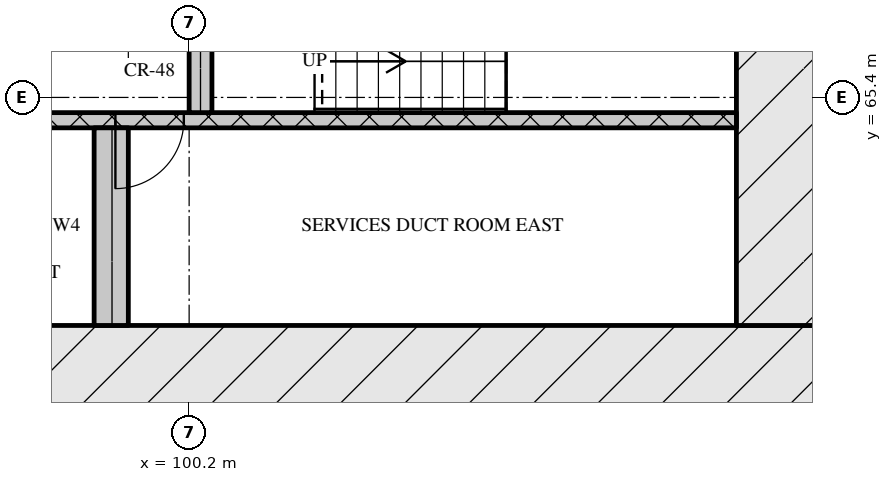
"""IFC4 building model, lengths in metres.
Left out: names, types, materials, properties, quantities, classifications, styles, units other than length and angle.
Written with IfcOpenShell. Run it as: python <this file> out.ifc"""

import sys

from ifc_helpers import new_model, si_unit, direction, frame, frame_2d, origin, place, context, subcontext, project, spatial, rectangle, extrude, element, fill, save


model = new_model("IFC4")
c1 = context("Model", 3, precision=1e-05, world=origin(), true_north=direction((0.0, 1.0)))
c2 = subcontext(c1, "Body", "Model", "MODEL_VIEW")
j1 = project(units=[si_unit("LENGTHUNIT", "METRE"), si_unit("PLANEANGLEUNIT", "RADIAN")], contexts=[c1])
p1 = place(None, origin())
s1 = spatial("IfcSite", under=j1, at=p1, CompositionType="ELEMENT")
p2 = place(p1, origin())
s2 = spatial("IfcBuilding", under=s1, at=p2, CompositionType="ELEMENT")
p3 = place(p2, frame((0.0, 0.0, 58.8)))
s3 = spatial("IfcBuildingStorey", under=s2, at=p3, CompositionType="ELEMENT", Elevation=58.8)
p4 = place(p3, frame((66.6, 61.8, 0.0), z_axis=(0.0, 0.0, 1.0), x_axis=(1.0, 0.0, 0.0)))
e1 = element("IfcWall", 1, at=p4, inside=s3, PredefinedType="SOLIDWALL", context=c2, shape_type="SweptSolid", body=[
    extrude(rectangle(XDim=42.0, YDim=1.2, at=frame_2d((21.0, 0.0))), origin(), (0.0, 0.0, 1.0), 3.32),
])
p5 = place(p4, frame((21.35, 0.0, 0.0)))
e2 = element("IfcOpeningElement", 2, at=p5, cuts=e1, PredefinedType="OPENING", context=c2, shape_type="SweptSolid", body=[
    extrude(rectangle(XDim=1.8, YDim=2.1, at=frame_2d((0.9, 1.05))), frame((0.0, 0.61, 0.0), z_axis=(0.0, -1.0, 0.0), x_axis=(1.0, 0.0, 0.0)), (0.0, 0.0, 1.0), 1.22),
])
p6 = place(p3, frame((108.0, 62.4, 0.0), z_axis=(0.0, 0.0, 1.0), x_axis=(0.0, 1.0, 0.0)))
e3 = element("IfcWall", 3, at=p6, inside=s3, PredefinedType="SOLIDWALL", context=c2, shape_type="SweptSolid", body=[
    extrude(rectangle(XDim=12.0, YDim=1.2, at=frame_2d((6.0, 0.0))), origin(), (0.0, 0.0, 1.0), 3.32),
])
p7 = place(p6, frame((6.45, 0.0, 0.0)))
e4 = element("IfcOpeningElement", 4, at=p7, cuts=e3, PredefinedType="OPENING", context=c2, shape_type="SweptSolid", body=[
    extrude(rectangle(XDim=1.2, YDim=2.1, at=frame_2d((0.6, 1.05))), frame((0.0, 0.61, 0.0), z_axis=(0.0, -1.0, 0.0), x_axis=(1.0, 0.0, 0.0)), (0.0, 0.0, 1.0), 1.22),
])
p8 = place(p3, frame((99.175, 62.4, 0.0), z_axis=(0.0, 0.0, 1.0), x_axis=(0.0, 1.0, 0.0)))
e5 = element("IfcWall", 5, at=p8, inside=s3, PredefinedType="SOLIDWALL", context=c2, shape_type="SweptSolid", body=[
    extrude(rectangle(XDim=2.6, YDim=0.45, at=frame_2d((1.3, 0.0))), origin(), (0.0, 0.0, 1.0), 3.32),
])
p9 = place(p3, frame((91.4, 65.1, 0.0), z_axis=(0.0, 0.0, 1.0), x_axis=(1.0, 0.0, 0.0)))
e6 = element("IfcWall", 6, at=p9, inside=s3, PredefinedType="SOLIDWALL", context=c2, shape_type="SweptSolid", body=[
    extrude(rectangle(XDim=16.0, YDim=0.2, at=frame_2d((8.0, 0.0))), origin(), (0.0, 0.0, 1.0), 3.32),
])
p10 = place(p9, frame((7.83, 0.0, 0.0)))
e7 = element("IfcOpeningElement", 7, at=p10, cuts=e6, PredefinedType="OPENING", context=c2, shape_type="SweptSolid", body=[
    extrude(rectangle(XDim=0.9, YDim=2.1, at=frame_2d((0.45, 1.05))), frame((0.0, 0.11, 0.0), z_axis=(0.0, -1.0, 0.0), x_axis=(1.0, 0.0, 0.0)), (0.0, 0.0, 1.0), 0.22),
])
p11 = place(p3, frame((100.35, 65.2, 0.0), z_axis=(0.0, 0.0, 1.0), x_axis=(0.0, 1.0, 0.0)))
e8 = element("IfcWall", 8, at=p11, inside=s3, PredefinedType="SOLIDWALL", context=c2, shape_type="SweptSolid", body=[
    extrude(rectangle(XDim=2.85, YDim=0.3, at=frame_2d((1.425, 0.0))), origin(), (0.0, 0.0, 1.0), 3.32),
])
p12 = place(p10, origin())
e9 = element("IfcDoor", 9, at=p12, inside=s3, OperationType="SINGLE_SWING_RIGHT", PredefinedType="DOOR", context=c2, shape_type="SweptSolid", body=[
    extrude(rectangle(XDim=0.9, YDim=2.1, at=frame_2d((0.45, 1.05))), frame((0.0, 0.025, 0.0), z_axis=(0.0, -1.0, 0.0), x_axis=(1.0, 0.0, 0.0)), (0.0, 0.0, 1.0), 0.05),
])
fill(e7, e9)
save(model, sys.argv[1])
